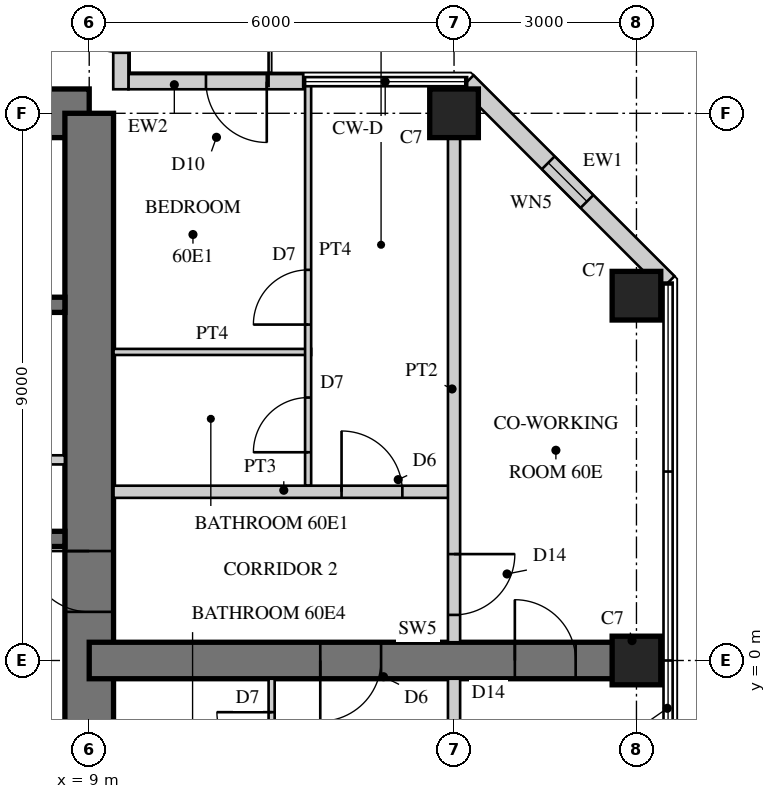
"""IFC4 building model, lengths in metres.
Left out: names, types, materials, properties, quantities, classifications, styles, units other than length and angle.
Written with IfcOpenShell. Run it as: python <this file> out.ifc"""

import sys

from ifc_helpers import new_model, si_unit, direction, frame, frame_2d, origin, origin_2d, place, context, subcontext, project, spatial, rectangle, hollow_rectangle, extrude, element, fill, save


model = new_model("IFC4")
c1 = context("Model", 3, precision=1e-05, world=origin(), true_north=direction((0.0, 1.0)))
c2 = subcontext(c1, "Body", "Model", "MODEL_VIEW")
j1 = project(units=[si_unit("LENGTHUNIT", "METRE"), si_unit("PLANEANGLEUNIT", "RADIAN")], contexts=[c1])
p1 = place(None, origin())
s1 = spatial("IfcSite", under=j1, at=p1, CompositionType="ELEMENT")
p2 = place(p1, origin())
s2 = spatial("IfcBuilding", under=s1, at=p2, CompositionType="ELEMENT")
p3 = place(p2, frame((0.0, 0.0, 235.7)))
s3 = spatial("IfcBuildingStorey", under=s2, at=p3, CompositionType="ELEMENT", Elevation=235.7)
p4 = place(p3, frame((9.0, 9.0, 0.0), z_axis=(0.0, 0.0, 1.0), x_axis=(-1.0, 0.0, 0.0)))
e1 = element("IfcWall", 1, at=p4, inside=s3, PredefinedType="SHEAR", context=c2, shape_type="SweptSolid", body=[
    extrude(rectangle(XDim=18.0, YDim=0.8, at=frame_2d((9.0, 0.0))), origin(), (0.0, 0.0, 1.0), 3.4),
])
p5 = place(p4, frame((9.8, 0.0, 0.0)))
e2 = element("IfcOpeningElement", 2, at=p5, cuts=e1, PredefinedType="OPENING", context=c2, shape_type="SweptSolid", body=[
    extrude(rectangle(XDim=1.0, YDim=2.4, at=frame_2d((0.5, 1.2))), frame((0.0, 0.41, 0.0), z_axis=(0.0, -1.0, 0.0), x_axis=(1.0, 0.0, 0.0)), (0.0, 0.0, 1.0), 0.82),
])
p6 = place(p3, frame((9.0, -9.0, 0.0), z_axis=(0.0, 0.0, 1.0), x_axis=(0.0, 1.0, 0.0)))
e3 = element("IfcWall", 3, at=p6, inside=s3, PredefinedType="SHEAR", context=c2, shape_type="SweptSolid", body=[
    extrude(rectangle(XDim=18.0, YDim=0.8, at=frame_2d((9.0, 0.0))), origin(), (0.0, 0.0, 1.0), 3.4),
])
p7 = place(p6, frame((9.8, 0.0, 0.0)))
e4 = element("IfcOpeningElement", 4, at=p7, cuts=e3, PredefinedType="OPENING", context=c2, shape_type="SweptSolid", body=[
    extrude(rectangle(XDim=1.0, YDim=2.4, at=frame_2d((0.5, 1.2))), frame((0.0, 0.41, 0.0), z_axis=(0.0, -1.0, 0.0), x_axis=(1.0, 0.0, 0.0)), (0.0, 0.0, 1.0), 0.82),
])
p8 = place(p3, frame((1.925, 2.0, 0.0), z_axis=(0.0, 0.0, 1.0), x_axis=(1.0, 0.0, 0.0)))
e5 = element("IfcWall", 5, at=p8, inside=s3, PredefinedType="SHEAR", context=c2, shape_type="SweptSolid", body=[
    extrude(rectangle(XDim=6.675, YDim=0.25, at=frame_2d((3.337, 0.0))), origin(), (0.0, 0.0, 1.0), 3.4),
])
p9 = place(p3, frame((1.925, 5.85, 0.0), z_axis=(0.0, 0.0, 1.0), x_axis=(1.0, 0.0, 0.0)))
e6 = element("IfcWall", 6, at=p9, inside=s3, PredefinedType="SHEAR", context=c2, shape_type="SweptSolid", body=[
    extrude(rectangle(XDim=6.675, YDim=0.25, at=frame_2d((3.337, 0.0))), origin(), (0.0, 0.0, 1.0), 3.4),
])
p10 = place(p9, frame((0.546, 0.0, 0.0)))
e7 = element("IfcOpeningElement", 7, at=p10, cuts=e6, PredefinedType="OPENING", context=c2, shape_type="SweptSolid", body=[
    extrude(rectangle(XDim=1.0, YDim=2.1, at=frame_2d((0.5, 1.05))), frame((0.0, 0.135, 0.0), z_axis=(0.0, -1.0, 0.0), x_axis=(1.0, 0.0, 0.0)), (0.0, 0.0, 1.0), 0.27),
])
p11 = place(p9, frame((5.129, 0.0, 0.0)))
e8 = element("IfcOpeningElement", 8, at=p11, cuts=e6, PredefinedType="OPENING", context=c2, shape_type="SweptSolid", body=[
    extrude(rectangle(XDim=1.0, YDim=2.1, at=frame_2d((0.5, 1.05))), frame((0.0, 0.135, 0.0), z_axis=(0.0, -1.0, 0.0), x_axis=(1.0, 0.0, 0.0)), (0.0, 0.0, 1.0), 0.27),
])
p12 = place(p3, frame((1.925, 3.3, 0.0), z_axis=(0.0, 0.0, 1.0), x_axis=(1.0, 0.0, 0.0)))
e9 = element("IfcWall", 9, at=p12, inside=s3, PredefinedType="PARTITIONING", context=c2, shape_type="SweptSolid", body=[
    extrude(rectangle(XDim=6.675, YDim=0.15, at=frame_2d((3.337, 0.0))), origin(), (0.0, 0.0, 1.0), 3.4),
])
p13 = place(p12, frame((0.075, 0.0, 0.0)))
e10 = element("IfcOpeningElement", 10, at=p13, cuts=e9, PredefinedType="OPENING", context=c2, shape_type="SweptSolid", body=[
    extrude(rectangle(XDim=0.8, YDim=2.1, at=frame_2d((0.4, 1.05))), frame((0.0, 0.085, 0.0), z_axis=(0.0, -1.0, 0.0), x_axis=(1.0, 0.0, 0.0)), (0.0, 0.0, 1.0), 0.17),
])
p14 = place(p12, frame((3.675, 0.0, 0.0)))
e11 = element("IfcOpeningElement", 11, at=p14, cuts=e9, PredefinedType="OPENING", context=c2, shape_type="SweptSolid", body=[
    extrude(rectangle(XDim=0.8, YDim=2.1, at=frame_2d((0.4, 1.05))), frame((0.0, 0.085, 0.0), z_axis=(0.0, -1.0, 0.0), x_axis=(1.0, 0.0, 0.0)), (0.0, 0.0, 1.0), 0.17),
])
p15 = place(p3, frame((9.0, 0.0, 0.0), z_axis=(0.0, 0.0, 1.0), x_axis=(1.0, 0.0, 0.0)))
e12 = element("IfcWall", 12, at=p15, inside=s3, PredefinedType="SHEAR", context=c2, shape_type="SweptSolid", body=[
    extrude(rectangle(XDim=9.0, YDim=0.6, at=frame_2d((4.5, 0.0))), origin(), (0.0, 0.0, 1.0), 3.4),
])
p16 = place(p15, frame((3.8, 0.0, 0.0)))
e13 = element("IfcOpeningElement", 13, at=p16, cuts=e12, PredefinedType="OPENING", context=c2, shape_type="SweptSolid", body=[
    extrude(rectangle(XDim=1.0, YDim=2.15, at=frame_2d((0.5, 1.075))), frame((0.0, 0.31, 0.0), z_axis=(0.0, -1.0, 0.0), x_axis=(1.0, 0.0, 0.0)), (0.0, 0.0, 1.0), 0.62),
])
p17 = place(p15, frame((7.0, 0.0, 0.0)))
e14 = element("IfcOpeningElement", 14, at=p17, cuts=e12, PredefinedType="OPENING", context=c2, shape_type="SweptSolid", body=[
    extrude(rectangle(XDim=1.0, YDim=2.2, at=frame_2d((0.5, 1.1))), frame((0.0, 0.31, 0.0), z_axis=(0.0, -1.0, 0.0), x_axis=(1.0, 0.0, 0.0)), (0.0, 0.0, 1.0), 0.62),
])
for number, where, z_axis, x_axis in (
    (15, (15.0, 9.0, 0.0), (0.0, 0.0, 1.0), (1.0, 0.0, 0.0)),
    (16, (18.0, 0.0, 0.0), (0.0, 0.0, 1.0), (1.0, 0.0, 0.0)),
    (17, (18.0, 6.0, 0.0), (0.0, 0.0, 1.0), (1.0, 0.0, 0.0)),
):
    element("IfcColumn", number, at=place(p3, frame(where, z_axis=z_axis, x_axis=x_axis)), inside=s3, PredefinedType="COLUMN", context=c2, shape_type="SweptSolid", body=[
        extrude(rectangle(XDim=0.8, YDim=0.8, at=origin_2d()), origin(), (0.0, 0.0, 1.0), 3.4),
    ])
p18 = place(p3, frame((18.52, 6.215, 0.0), z_axis=(0.0, 0.0, 1.0), x_axis=(-0.707106781187, 0.707106781187, 0.0)))
e18 = element("IfcWall", 18, at=p18, inside=s3, PredefinedType="SOLIDWALL", context=c2, shape_type="SweptSolid", body=[
    extrude(rectangle(XDim=4.674, YDim=0.3, at=frame_2d((2.337, 0.0))), origin(), (0.0, 0.0, 1.0), 3.22),
])
p19 = place(p18, frame((1.887, 0.0, 0.3)))
e19 = element("IfcOpeningElement", 19, at=p19, cuts=e18, PredefinedType="OPENING", context=c2, shape_type="SweptSolid", body=[
    extrude(rectangle(XDim=0.9, YDim=2.4, at=frame_2d((0.45, 1.2))), frame((0.0, 0.16, 0.0), z_axis=(0.0, -1.0, 0.0), x_axis=(1.0, 0.0, 0.0)), (0.0, 0.0, 1.0), 0.32),
])
p20 = place(p3, frame((12.52, 9.52, 0.0), z_axis=(0.0, 0.0, 1.0), x_axis=(-1.0, 0.0, 0.0)))
e20 = element("IfcWall", 20, at=p20, inside=s3, PredefinedType="SOLIDWALL", context=c2, shape_type="SweptSolid", body=[
    extrude(rectangle(XDim=2.875, YDim=0.25, at=frame_2d((1.438, 0.0))), origin(), (0.0, 0.0, 1.0), 3.22),
])
p21 = place(p20, frame((0.6, 0.0, 0.0)))
e21 = element("IfcOpeningElement", 21, at=p21, cuts=e20, PredefinedType="OPENING", context=c2, shape_type="SweptSolid", body=[
    extrude(rectangle(XDim=1.0, YDim=2.2, at=frame_2d((0.5, 1.1))), frame((0.0, 0.135, 0.0), z_axis=(0.0, -1.0, 0.0), x_axis=(1.0, 0.0, 0.0)), (0.0, 0.0, 1.0), 0.27),
])
p22 = place(p3, frame((9.52, 9.395, 0.0), z_axis=(0.0, 0.0, 1.0), x_axis=(0.0, 1.0, 0.0)))
e22 = element("IfcWall", 22, at=p22, inside=s3, PredefinedType="SOLIDWALL", context=c2, shape_type="SweptSolid", body=[
    extrude(rectangle(XDim=3.125, YDim=0.25, at=frame_2d((1.562, 0.0))), origin(), (0.0, 0.0, 1.0), 3.22),
])
p23 = place(p22, frame((0.6, 0.0, 0.0)))
e23 = element("IfcOpeningElement", 23, at=p23, cuts=e22, PredefinedType="OPENING", context=c2, shape_type="SweptSolid", body=[
    extrude(rectangle(XDim=1.0, YDim=2.2, at=frame_2d((0.5, 1.1))), frame((0.0, 0.135, 0.0), z_axis=(0.0, -1.0, 0.0), x_axis=(1.0, 0.0, 0.0)), (0.0, 0.0, 1.0), 0.27),
])
p24 = place(p3, frame((9.4, 5.075, 0.0), z_axis=(0.0, 0.0, 1.0), x_axis=(1.0, 0.0, 0.0)))
e24 = element("IfcWall", 24, at=p24, inside=s3, PredefinedType="PARTITIONING", context=c2, shape_type="SweptSolid", body=[
    extrude(rectangle(XDim=3.25, YDim=0.1, at=frame_2d((1.625, 0.0))), origin(), (0.0, 0.0, 1.0), 3.22),
])
p25 = place(p3, frame((12.6, 2.875, 0.0), z_axis=(0.0, 0.0, 1.0), x_axis=(0.0, 1.0, 0.0)))
e25 = element("IfcWall", 25, at=p25, inside=s3, PredefinedType="PARTITIONING", context=c2, shape_type="SweptSolid", body=[
    extrude(rectangle(XDim=6.605, YDim=0.1, at=frame_2d((3.302, 0.0))), origin(), (0.0, 0.0, 1.0), 3.22),
])
p26 = place(p25, frame((0.55, 0.0, 0.0)))
e26 = element("IfcOpeningElement", 26, at=p26, cuts=e25, PredefinedType="OPENING", context=c2, shape_type="SweptSolid", body=[
    extrude(rectangle(XDim=0.9, YDim=2.1, at=frame_2d((0.45, 1.05))), frame((0.0, 0.06, 0.0), z_axis=(0.0, -1.0, 0.0), x_axis=(1.0, 0.0, 0.0)), (0.0, 0.0, 1.0), 0.12),
])
p27 = place(p25, frame((2.65, 0.0, 0.0)))
e27 = element("IfcOpeningElement", 27, at=p27, cuts=e25, PredefinedType="OPENING", context=c2, shape_type="SweptSolid", body=[
    extrude(rectangle(XDim=0.9, YDim=2.1, at=frame_2d((0.45, 1.05))), frame((0.0, 0.06, 0.0), z_axis=(0.0, -1.0, 0.0), x_axis=(1.0, 0.0, 0.0)), (0.0, 0.0, 1.0), 0.12),
])
p28 = place(p3, frame((12.0, -9.395, 0.0), z_axis=(0.0, 0.0, 1.0), x_axis=(0.0, 1.0, 0.0)))
e28 = element("IfcWall", 28, at=p28, inside=s3, PredefinedType="PARTITIONING", context=c2, shape_type="SweptSolid", body=[
    extrude(rectangle(XDim=9.095, YDim=0.1, at=frame_2d((4.547, 0.0))), origin(), (0.0, 0.0, 1.0), 3.22),
])
p29 = place(p28, frame((5.545, 0.0, 0.0)))
e29 = element("IfcOpeningElement", 29, at=p29, cuts=e28, PredefinedType="OPENING", context=c2, shape_type="SweptSolid", body=[
    extrude(rectangle(XDim=0.9, YDim=2.1, at=frame_2d((0.45, 1.05))), frame((0.0, 0.06, 0.0), z_axis=(0.0, -1.0, 0.0), x_axis=(1.0, 0.0, 0.0)), (0.0, 0.0, 1.0), 0.12),
])
p30 = place(p28, frame((7.645, 0.0, 0.0)))
e30 = element("IfcOpeningElement", 30, at=p30, cuts=e28, PredefinedType="OPENING", context=c2, shape_type="SweptSolid", body=[
    extrude(rectangle(XDim=0.9, YDim=2.1, at=frame_2d((0.45, 1.05))), frame((0.0, 0.06, 0.0), z_axis=(0.0, -1.0, 0.0), x_axis=(1.0, 0.0, 0.0)), (0.0, 0.0, 1.0), 0.12),
])
p31 = place(p3, frame((9.4, 2.775, 0.0), z_axis=(0.0, 0.0, 1.0), x_axis=(1.0, 0.0, 0.0)))
e31 = element("IfcWall", 31, at=p31, inside=s3, PredefinedType="SOLIDWALL", context=c2, shape_type="SweptSolid", body=[
    extrude(rectangle(XDim=5.6, YDim=0.2, at=frame_2d((2.8, 0.0))), origin(), (0.0, 0.0, 1.0), 3.22),
])
p32 = place(p31, frame((3.75, 0.0, 0.0)))
e32 = element("IfcOpeningElement", 32, at=p32, cuts=e31, PredefinedType="OPENING", context=c2, shape_type="SweptSolid", body=[
    extrude(rectangle(XDim=1.0, YDim=2.15, at=frame_2d((0.5, 1.075))), frame((0.0, 0.11, 0.0), z_axis=(0.0, -1.0, 0.0), x_axis=(1.0, 0.0, 0.0)), (0.0, 0.0, 1.0), 0.22),
])
p33 = place(p3, frame((15.0, -8.6, 0.0), z_axis=(0.0, 0.0, 1.0), x_axis=(0.0, 1.0, 0.0)))
e33 = element("IfcWall", 33, at=p33, inside=s3, PredefinedType="SOLIDWALL", context=c2, shape_type="SweptSolid", body=[
    extrude(rectangle(XDim=8.3, YDim=0.2, at=frame_2d((4.15, 0.0))), origin(), (0.0, 0.0, 1.0), 2.52),
])
p34 = place(p3, frame((15.0, 0.3, 0.0), z_axis=(0.0, 0.0, 1.0), x_axis=(0.0, 1.0, 0.0)))
e34 = element("IfcWall", 34, at=p34, inside=s3, PredefinedType="SOLIDWALL", context=c2, shape_type="SweptSolid", body=[
    extrude(rectangle(XDim=8.3, YDim=0.2, at=frame_2d((4.15, 0.0))), origin(), (0.0, 0.0, 1.0), 2.52),
])
p35 = place(p34, frame((0.45, 0.0, 0.0)))
e35 = element("IfcOpeningElement", 35, at=p35, cuts=e34, PredefinedType="OPENING", context=c2, shape_type="SweptSolid", body=[
    extrude(rectangle(XDim=1.0, YDim=2.2, at=frame_2d((0.5, 1.1))), frame((0.0, 0.11, 0.0), z_axis=(0.0, -1.0, 0.0), x_axis=(1.0, 0.0, 0.0)), (0.0, 0.0, 1.0), 0.22),
])
p36 = place(p19, origin())
e36 = element("IfcWindow", 36, at=p36, inside=s3, PartitioningType="SINGLE_PANEL", PredefinedType="WINDOW", context=c2, shape_type="SweptSolid", body=[
    extrude(hollow_rectangle(XDim=0.9, YDim=2.4, WallThickness=0.06, at=frame_2d((0.45, 1.2))), frame((0.0, 0.03, 0.0), z_axis=(0.0, -1.0, 0.0), x_axis=(1.0, 0.0, 0.0)), (0.0, 0.0, 1.0), 0.06),
    extrude(rectangle(XDim=0.779, YDim=2.279, at=frame_2d((0.45, 1.2))), frame((0.0, 0.03, 0.0), z_axis=(0.0, -1.0, 0.0), x_axis=(1.0, 0.0, 0.0)), (0.0, 0.0, 1.0), 0.06),
])
fill(e19, e36)
p37 = place(p21, origin())
e37 = element("IfcDoor", 37, at=p37, inside=s3, OperationType="SINGLE_SWING_LEFT", PredefinedType="DOOR", context=c2, shape_type="SweptSolid", body=[
    extrude(hollow_rectangle(XDim=1.0, YDim=2.2, WallThickness=0.06, at=frame_2d((0.5, 1.1))), frame((0.0, 0.025, 0.0), z_axis=(0.0, -1.0, 0.0), x_axis=(1.0, 0.0, 0.0)), (0.0, 0.0, 1.0), 0.05),
    extrude(rectangle(XDim=0.879, YDim=2.079, at=frame_2d((0.5, 1.1))), frame((0.0, 0.025, 0.0), z_axis=(0.0, -1.0, 0.0), x_axis=(1.0, 0.0, 0.0)), (0.0, 0.0, 1.0), 0.05),
])
fill(e21, e37)
p38 = place(p23, origin())
e38 = element("IfcDoor", 38, at=p38, inside=s3, OperationType="SINGLE_SWING_RIGHT", PredefinedType="DOOR", context=c2, shape_type="SweptSolid", body=[
    extrude(hollow_rectangle(XDim=1.0, YDim=2.2, WallThickness=0.06, at=frame_2d((0.5, 1.1))), frame((0.0, 0.025, 0.0), z_axis=(0.0, -1.0, 0.0), x_axis=(1.0, 0.0, 0.0)), (0.0, 0.0, 1.0), 0.05),
    extrude(rectangle(XDim=0.879, YDim=2.079, at=frame_2d((0.5, 1.1))), frame((0.0, 0.025, 0.0), z_axis=(0.0, -1.0, 0.0), x_axis=(1.0, 0.0, 0.0)), (0.0, 0.0, 1.0), 0.05),
])
fill(e23, e38)
p39 = place(p26, origin())
e39 = element("IfcDoor", 39, at=p39, inside=s3, OperationType="SINGLE_SWING_LEFT", PredefinedType="DOOR", context=c2, shape_type="SweptSolid", body=[
    extrude(rectangle(XDim=0.9, YDim=2.1, at=frame_2d((0.45, 1.05))), frame((0.0, 0.025, 0.0), z_axis=(0.0, -1.0, 0.0), x_axis=(1.0, 0.0, 0.0)), (0.0, 0.0, 1.0), 0.05),
])
fill(e26, e39)
p40 = place(p27, origin())
e40 = element("IfcDoor", 40, at=p40, inside=s3, OperationType="SINGLE_SWING_LEFT", PredefinedType="DOOR", context=c2, shape_type="SweptSolid", body=[
    extrude(rectangle(XDim=0.9, YDim=2.1, at=frame_2d((0.45, 1.05))), frame((0.0, 0.025, 0.0), z_axis=(0.0, -1.0, 0.0), x_axis=(1.0, 0.0, 0.0)), (0.0, 0.0, 1.0), 0.05),
])
fill(e27, e40)
p41 = place(p30, origin())
e41 = element("IfcDoor", 41, at=p41, inside=s3, OperationType="SINGLE_SWING_RIGHT", PredefinedType="DOOR", context=c2, shape_type="SweptSolid", body=[
    extrude(rectangle(XDim=0.9, YDim=2.1, at=frame_2d((0.45, 1.05))), frame((0.0, 0.025, 0.0), z_axis=(0.0, -1.0, 0.0), x_axis=(1.0, 0.0, 0.0)), (0.0, 0.0, 1.0), 0.05),
])
fill(e30, e41)
p42 = place(p32, origin())
e42 = element("IfcDoor", 42, at=p42, inside=s3, OperationType="SINGLE_SWING_LEFT", PredefinedType="DOOR", context=c2, shape_type="SweptSolid", body=[
    extrude(rectangle(XDim=1.0, YDim=2.15, at=frame_2d((0.5, 1.075))), frame((0.0, 0.025, 0.0), z_axis=(0.0, -1.0, 0.0), x_axis=(1.0, 0.0, 0.0)), (0.0, 0.0, 1.0), 0.05),
])
fill(e32, e42)
p43 = place(p35, frame((1.0, 0.0, 0.0), z_axis=(0.0, 0.0, 1.0), x_axis=(-1.0, 0.0, 0.0)))
e43 = element("IfcDoor", 43, at=p43, inside=s3, OperationType="SINGLE_SWING_LEFT", PredefinedType="DOOR", context=c2, shape_type="SweptSolid", body=[
    extrude(rectangle(XDim=1.0, YDim=2.2, at=frame_2d((0.5, 1.1))), frame((0.0, 0.025, 0.0), z_axis=(0.0, -1.0, 0.0), x_axis=(1.0, 0.0, 0.0)), (0.0, 0.0, 1.0), 0.05),
])
fill(e35, e43)
p44 = place(p16, frame((1.0, 0.0, 0.0), z_axis=(0.0, 0.0, 1.0), x_axis=(-1.0, 0.0, 0.0)))
e44 = element("IfcDoor", 44, at=p44, inside=s3, OperationType="SINGLE_SWING_RIGHT", PredefinedType="DOOR", context=c2, shape_type="SweptSolid", body=[
    extrude(rectangle(XDim=1.0, YDim=2.15, at=frame_2d((0.5, 1.075))), frame((0.0, 0.025, 0.0), z_axis=(0.0, -1.0, 0.0), x_axis=(1.0, 0.0, 0.0)), (0.0, 0.0, 1.0), 0.05),
])
fill(e13, e44)
p45 = place(p17, origin())
e45 = element("IfcDoor", 45, at=p45, inside=s3, OperationType="SINGLE_SWING_LEFT", PredefinedType="DOOR", context=c2, shape_type="SweptSolid", body=[
    extrude(rectangle(XDim=1.0, YDim=2.2, at=frame_2d((0.5, 1.1))), frame((0.0, 0.025, 0.0), z_axis=(0.0, -1.0, 0.0), x_axis=(1.0, 0.0, 0.0)), (0.0, 0.0, 1.0), 0.05),
])
fill(e14, e45)
p46 = place(p7, origin())
e46 = element("IfcDoor", 46, at=p46, inside=s3, OperationType="SINGLE_SWING_RIGHT", PredefinedType="DOOR", context=c2, shape_type="SweptSolid", body=[
    extrude(rectangle(XDim=1.0, YDim=2.4, at=frame_2d((0.5, 1.2))), frame((0.0, 0.055, 0.0), z_axis=(0.0, -1.0, 0.0), x_axis=(1.0, 0.0, 0.0)), (0.0, 0.0, 1.0), 0.05),
])
fill(e4, e46)
save(model, sys.argv[1])
